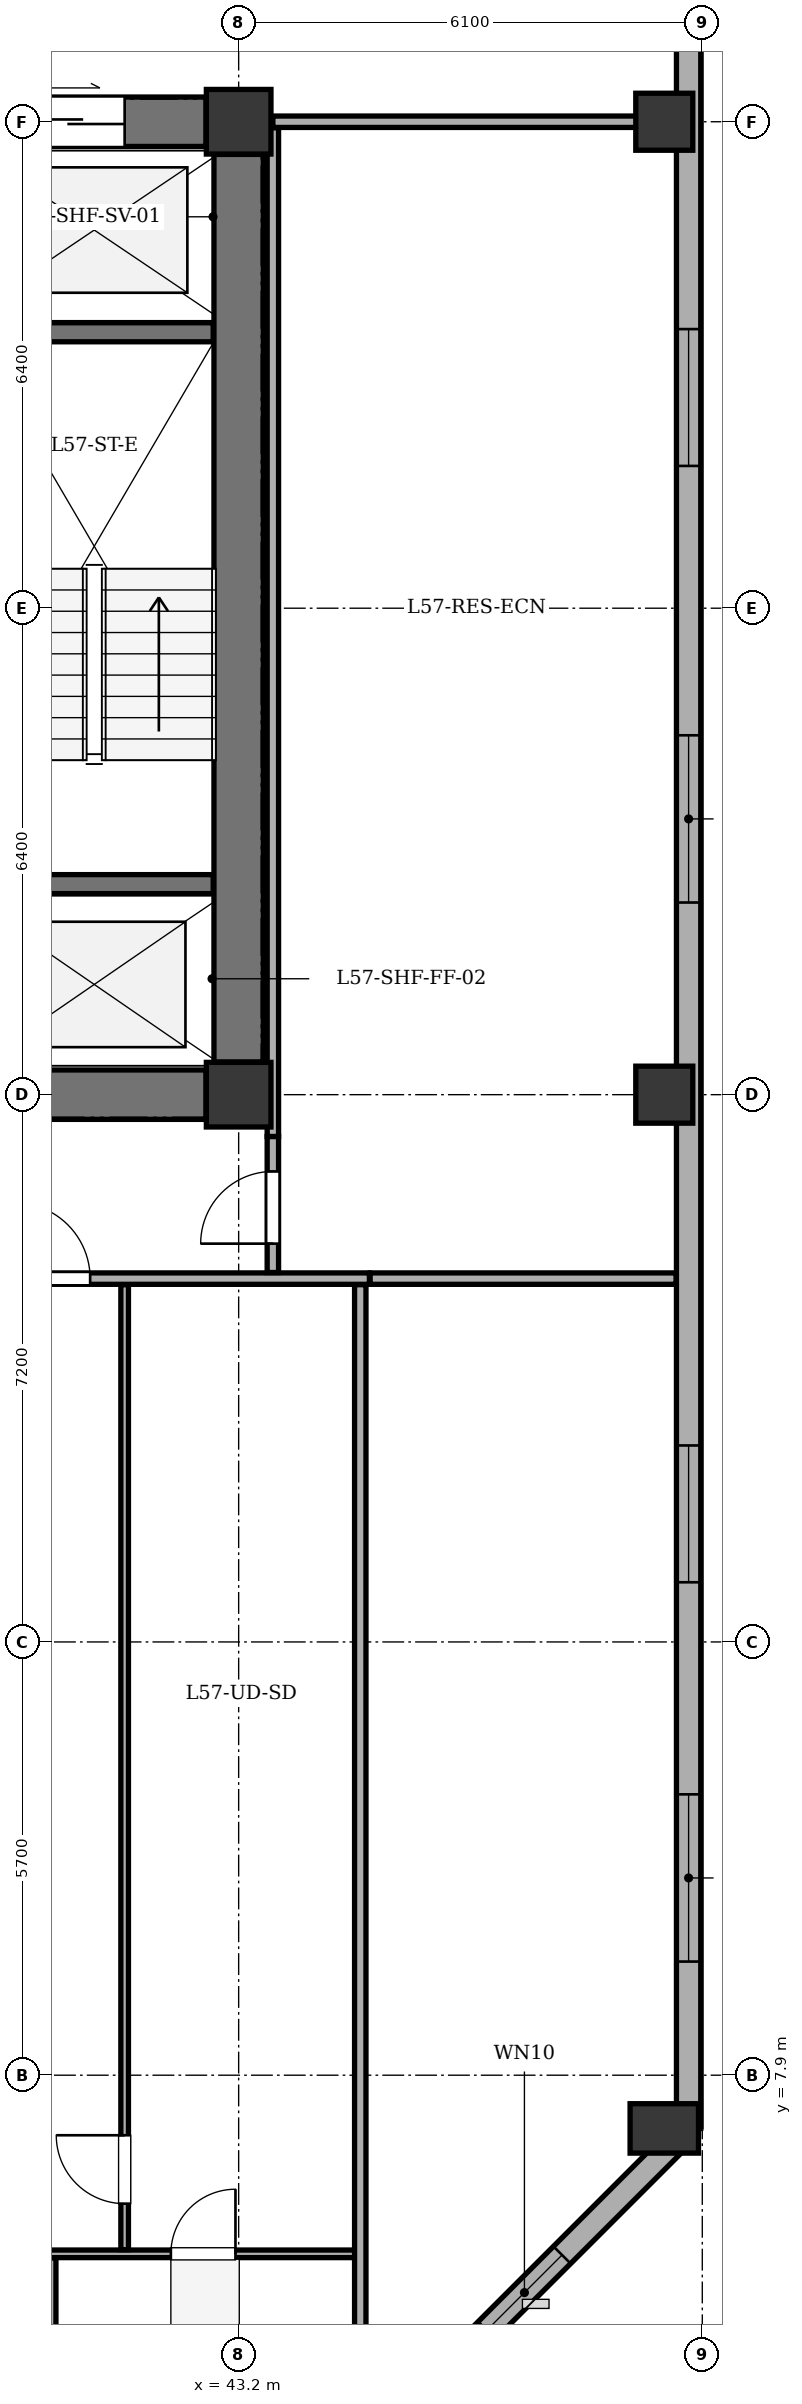
"""IFC4 building model, lengths in metres.
Left out: names, types, materials, properties, quantities, classifications, styles, units other than length and angle.
Written with IfcOpenShell. Run it as: python <this file> out.ifc"""

import sys

from ifc_helpers import new_model, si_unit, direction, frame, frame_2d, origin, origin_2d, place, context, subcontext, project, spatial, rectangle, extrude, element, fill, save


model = new_model("IFC4")
c1 = context("Model", 3, precision=1e-05, world=origin(), true_north=direction((0.0, 1.0)))
c2 = subcontext(c1, "Body", "Model", "MODEL_VIEW")
j1 = project(units=[si_unit("LENGTHUNIT", "METRE"), si_unit("PLANEANGLEUNIT", "RADIAN")], contexts=[c1])
p1 = place(None, origin())
s1 = spatial("IfcSite", under=j1, at=p1, CompositionType="ELEMENT")
p2 = place(p1, origin())
s2 = spatial("IfcBuilding", under=s1, at=p2, CompositionType="ELEMENT")
p3 = place(p2, frame((0.0, 0.0, 221.1)))
s3 = spatial("IfcBuildingStorey", under=s2, at=p3, CompositionType="ELEMENT", Elevation=221.1)
for number, where, z_axis, x_axis in (
    (1, (43.2, 20.8, 0.0), (0.0, 0.0, 1.0), (1.0, 0.0, 0.0)),
    (2, (43.2, 33.6, 0.0), (0.0, 0.0, 1.0), (1.0, 0.0, 0.0)),
):
    element("IfcColumn", number, at=place(p3, frame(where, z_axis=z_axis, x_axis=x_axis)), inside=s3, PredefinedType="COLUMN", context=c2, shape_type="SweptSolid", body=[
        extrude(rectangle(XDim=0.85, YDim=0.85, at=origin_2d()), origin(), (0.0, 0.0, 1.0), 3.4),
    ])
p4 = place(p3, frame((48.8, 7.2, 0.0), z_axis=(0.0, 0.0, 1.0), x_axis=(1.0, 0.0, 0.0)))
e3 = element("IfcColumn", 3, at=p4, inside=s3, PredefinedType="COLUMN", context=c2, shape_type="SweptSolid", body=[
    extrude(rectangle(XDim=0.65, YDim=0.9, at=origin_2d()), origin(), (0.0, 0.0, 1.0), 3.4),
])
for number, where, z_axis, x_axis in (
    (4, (48.8, 20.8, 0.0), (0.0, 0.0, 1.0), (1.0, 0.0, 0.0)),
    (5, (48.8, 33.6, 0.0), (0.0, 0.0, 1.0), (1.0, 0.0, 0.0)),
):
    element("IfcColumn", number, at=place(p3, frame(where, z_axis=z_axis, x_axis=x_axis)), inside=s3, PredefinedType="COLUMN", context=c2, shape_type="SweptSolid", body=[
        extrude(rectangle(XDim=0.75, YDim=0.75, at=origin_2d()), origin(), (0.0, 0.0, 1.0), 3.4),
    ])
p5 = place(p3, frame((49.12, 35.0, 0.0), z_axis=(0.0, 0.0, 1.0), x_axis=(0.0, -1.0, 0.0)))
e6 = element("IfcWall", 6, at=p5, inside=s3, PredefinedType="STANDARD", context=c2, shape_type="SweptSolid", body=[
    extrude(rectangle(XDim=27.8, YDim=0.32, at=frame_2d((13.9, 0.0))), origin(), (0.0, 0.0, 1.0), 2.725),
])
p6 = place(p5, frame((4.128, 0.0, 0.75)))
e7 = element("IfcOpeningElement", 7, at=p6, cuts=e6, PredefinedType="OPENING", context=c2, shape_type="SweptSolid", body=[
    extrude(rectangle(XDim=1.8, YDim=1.7, at=frame_2d((0.9, 0.85))), frame((0.0, 0.17, 0.0), z_axis=(0.0, -1.0, 0.0), x_axis=(1.0, 0.0, 0.0)), (0.0, 0.0, 1.0), 0.34),
])
p7 = place(p5, frame((9.472, 0.0, 0.75)))
e8 = element("IfcOpeningElement", 8, at=p7, cuts=e6, PredefinedType="OPENING", context=c2, shape_type="SweptSolid", body=[
    extrude(rectangle(XDim=2.2, YDim=1.7, at=frame_2d((1.1, 0.85))), frame((0.0, 0.17, 0.0), z_axis=(0.0, -1.0, 0.0), x_axis=(1.0, 0.0, 0.0)), (0.0, 0.0, 1.0), 0.34),
])
p8 = place(p5, frame((18.815, 0.0, 0.75)))
e9 = element("IfcOpeningElement", 9, at=p8, cuts=e6, PredefinedType="OPENING", context=c2, shape_type="SweptSolid", body=[
    extrude(rectangle(XDim=1.8, YDim=1.7, at=frame_2d((0.9, 0.85))), frame((0.0, 0.17, 0.0), z_axis=(0.0, -1.0, 0.0), x_axis=(1.0, 0.0, 0.0)), (0.0, 0.0, 1.0), 0.34),
])
p9 = place(p5, frame((23.405, 0.0, 0.75)))
e10 = element("IfcOpeningElement", 10, at=p9, cuts=e6, PredefinedType="OPENING", context=c2, shape_type="SweptSolid", body=[
    extrude(rectangle(XDim=2.2, YDim=1.7, at=frame_2d((1.1, 0.85))), frame((0.0, 0.17, 0.0), z_axis=(0.0, -1.0, 0.0), x_axis=(1.0, 0.0, 0.0)), (0.0, 0.0, 1.0), 0.34),
])
p10 = place(p3, frame((49.12, 7.2, 0.0), z_axis=(0.0, 0.0, 1.0), x_axis=(-0.707106781187, -0.707106781187, 0.0)))
e11 = element("IfcWall", 11, at=p10, inside=s3, PredefinedType="STANDARD", context=c2, shape_type="SweptSolid", body=[
    extrude(rectangle(XDim=6.11, YDim=0.32, at=frame_2d((3.055, 0.0))), origin(), (0.0, 0.0, 1.0), 2.725),
])
p11 = place(p10, frame((2.355, 0.0, 0.75)))
e12 = element("IfcOpeningElement", 12, at=p11, cuts=e11, PredefinedType="OPENING", context=c2, shape_type="SweptSolid", body=[
    extrude(rectangle(XDim=1.4, YDim=1.65, at=frame_2d((0.7, 0.825))), frame((0.0, 0.17, 0.0), z_axis=(0.0, -1.0, 0.0), x_axis=(1.0, 0.0, 0.0)), (0.0, 0.0, 1.0), 0.34),
])
p12 = place(p3, frame((43.2, 21.23, 0.0), z_axis=(0.0, 0.0, 1.0), x_axis=(0.0, 1.0, 0.0)))
e13 = element("IfcWall", 13, at=p12, inside=s3, PredefinedType="SHEAR", context=c2, shape_type="SweptSolid", body=[
    extrude(rectangle(XDim=11.94, YDim=0.65, at=frame_2d((5.97, 0.0))), origin(), (0.0, 0.0, 1.0), 3.1),
])
p13 = place(p3, frame((35.63, 20.8, 0.0), z_axis=(0.0, 0.0, 1.0), x_axis=(1.0, 0.0, 0.0)))
e14 = element("IfcWall", 14, at=p13, inside=s3, PredefinedType="SHEAR", context=c2, shape_type="SweptSolid", body=[
    extrude(rectangle(XDim=7.14, YDim=0.65, at=frame_2d((3.57, 0.0))), origin(), (0.0, 0.0, 1.0), 3.1),
])
p14 = place(p3, frame((35.63, 33.6, 0.0), z_axis=(0.0, 0.0, 1.0), x_axis=(1.0, 0.0, 0.0)))
e15 = element("IfcWall", 15, at=p14, inside=s3, PredefinedType="SHEAR", context=c2, shape_type="SweptSolid", body=[
    extrude(rectangle(XDim=7.14, YDim=0.65, at=frame_2d((3.57, 0.0))), origin(), (0.0, 0.0, 1.0), 3.1),
])
p15 = place(p14, frame((4.77, 0.0, 0.0)))
e16 = element("IfcOpeningElement", 16, at=p15, cuts=e15, PredefinedType="OPENING", context=c2, shape_type="SweptSolid", body=[
    extrude(rectangle(XDim=1.3, YDim=2.15, at=frame_2d((0.65, 1.075))), frame((0.0, 0.335, 0.0), z_axis=(0.0, -1.0, 0.0), x_axis=(1.0, 0.0, 0.0)), (0.0, 0.0, 1.0), 0.67),
])
p16 = place(p14, frame((2.57, 0.0, 0.0)))
e17 = element("IfcOpeningElement", 17, at=p16, cuts=e15, PredefinedType="OPENING", context=c2, shape_type="SweptSolid", body=[
    extrude(rectangle(XDim=0.85, YDim=2.02, at=frame_2d((0.425, 1.01))), frame((0.0, 0.335, 0.0), z_axis=(0.0, -1.0, 0.0), x_axis=(1.0, 0.0, 0.0)), (0.0, 0.0, 1.0), 0.67),
])
for number, where, z_axis, x_axis in (
    (18, (39.69, 23.57, 0.0), (0.0, 0.0, 1.0), (1.0, 0.0, 0.0)),
    (19, (39.69, 30.83, 0.0), (0.0, 0.0, 1.0), (1.0, 0.0, 0.0)),
):
    element("IfcWall", number, at=place(p3, frame(where, z_axis=z_axis, x_axis=x_axis)), inside=s3, PredefinedType="SHEAR", context=c2, shape_type="SweptSolid", body=[
        extrude(rectangle(XDim=3.175, YDim=0.25, at=frame_2d((1.587, 0.0))), origin(), (0.0, 0.0, 1.0), 3.1),
    ])
p17 = place(p3, frame((10.9, 18.38, 0.0), z_axis=(0.0, 0.0, 1.0), x_axis=(1.0, 0.0, 0.0)))
e20 = element("IfcWall", 20, at=p17, inside=s3, PredefinedType="PARTITIONING", context=c2, shape_type="SweptSolid", body=[
    extrude(rectangle(XDim=34.02, YDim=0.15, at=frame_2d((17.01, 0.0))), origin(), (0.0, 0.0, 1.0), 3.1),
])
p18 = place(p17, frame((3.674, 0.0, 0.0)))
e21 = element("IfcOpeningElement", 21, at=p18, cuts=e20, PredefinedType="OPENING", context=c2, shape_type="SweptSolid", body=[
    extrude(rectangle(XDim=1.0, YDim=2.1, at=frame_2d((0.5, 1.05))), frame((0.0, 0.085, 0.0), z_axis=(0.0, -1.0, 0.0), x_axis=(1.0, 0.0, 0.0)), (0.0, 0.0, 1.0), 0.17),
])
p19 = place(p17, frame((12.118, 0.0, 0.0)))
e22 = element("IfcOpeningElement", 22, at=p19, cuts=e20, PredefinedType="OPENING", context=c2, shape_type="SweptSolid", body=[
    extrude(rectangle(XDim=1.0, YDim=2.1, at=frame_2d((0.5, 1.05))), frame((0.0, 0.085, 0.0), z_axis=(0.0, -1.0, 0.0), x_axis=(1.0, 0.0, 0.0)), (0.0, 0.0, 1.0), 0.17),
])
p20 = place(p17, frame((20.901, 0.0, 0.0)))
e23 = element("IfcOpeningElement", 23, at=p20, cuts=e20, PredefinedType="OPENING", context=c2, shape_type="SweptSolid", body=[
    extrude(rectangle(XDim=1.0, YDim=2.1, at=frame_2d((0.5, 1.05))), frame((0.0, 0.085, 0.0), z_axis=(0.0, -1.0, 0.0), x_axis=(1.0, 0.0, 0.0)), (0.0, 0.0, 1.0), 0.17),
])
p21 = place(p17, frame((29.346, 0.0, 0.0)))
e24 = element("IfcOpeningElement", 24, at=p21, cuts=e20, PredefinedType="OPENING", context=c2, shape_type="SweptSolid", body=[
    extrude(rectangle(XDim=1.0, YDim=2.1, at=frame_2d((0.5, 1.05))), frame((0.0, 0.085, 0.0), z_axis=(0.0, -1.0, 0.0), x_axis=(1.0, 0.0, 0.0)), (0.0, 0.0, 1.0), 0.17),
])
p22 = place(p3, frame((36.773, 5.55, 0.0), z_axis=(0.0, 0.0, 1.0), x_axis=(1.0, 0.0, 0.0)))
e25 = element("IfcWall", 25, at=p22, inside=s3, PredefinedType="PARTITIONING", context=c2, shape_type="SweptSolid", body=[
    extrude(rectangle(XDim=8.067, YDim=0.1, at=frame_2d((4.034, 0.0))), origin(), (0.0, 0.0, 1.0), 3.1),
])
p23 = place(p22, frame((1.561, 0.0, 0.0)))
e26 = element("IfcOpeningElement", 26, at=p23, cuts=e25, PredefinedType="OPENING", context=c2, shape_type="SweptSolid", body=[
    extrude(rectangle(XDim=0.85, YDim=2.05, at=frame_2d((0.425, 1.025))), frame((0.0, 0.06, 0.0), z_axis=(0.0, -1.0, 0.0), x_axis=(1.0, 0.0, 0.0)), (0.0, 0.0, 1.0), 0.12),
])
p24 = place(p22, frame((5.535, 0.0, 0.0)))
e27 = element("IfcOpeningElement", 27, at=p24, cuts=e25, PredefinedType="OPENING", context=c2, shape_type="SweptSolid", body=[
    extrude(rectangle(XDim=0.85, YDim=2.05, at=frame_2d((0.425, 1.025))), frame((0.0, 0.06, 0.0), z_axis=(0.0, -1.0, 0.0), x_axis=(1.0, 0.0, 0.0)), (0.0, 0.0, 1.0), 0.12),
])
p25 = place(p3, frame((41.7, 5.605, 0.0), z_axis=(0.0, 0.0, 1.0), x_axis=(0.0, 1.0, 0.0)))
e28 = element("IfcWall", 28, at=p25, inside=s3, PredefinedType="PARTITIONING", context=c2, shape_type="SweptSolid", body=[
    extrude(rectangle(XDim=12.695, YDim=0.1, at=frame_2d((6.348, 0.0))), origin(), (0.0, 0.0, 1.0), 3.1),
])
p26 = place(p25, frame((0.605, 0.0, 0.0)))
e29 = element("IfcOpeningElement", 29, at=p26, cuts=e28, PredefinedType="OPENING", context=c2, shape_type="SweptSolid", body=[
    extrude(rectangle(XDim=0.9, YDim=2.05, at=frame_2d((0.45, 1.025))), frame((0.0, 0.06, 0.0), z_axis=(0.0, -1.0, 0.0), x_axis=(1.0, 0.0, 0.0)), (0.0, 0.0, 1.0), 0.12),
])
p27 = place(p3, frame((40.746, 3.045, 0.0), z_axis=(0.0, 0.0, 1.0), x_axis=(0.0, 1.0, 0.0)))
e30 = element("IfcWall", 30, at=p27, inside=s3, PredefinedType="PARTITIONING", context=c2, shape_type="SweptSolid", body=[
    extrude(rectangle(XDim=2.45, YDim=0.1, at=frame_2d((1.225, 0.0))), origin(), (0.0, 0.0, 1.0), 3.1),
])
p28 = place(p3, frame((44.8, 3.045, 0.0), z_axis=(0.0, 0.0, 1.0), x_axis=(0.0, 1.0, 0.0)))
e31 = element("IfcWall", 31, at=p28, inside=s3, PredefinedType="PARTITIONING", context=c2, shape_type="SweptSolid", body=[
    extrude(rectangle(XDim=15.255, YDim=0.15, at=frame_2d((7.627, 0.0))), origin(), (0.0, 0.0, 1.0), 3.1),
])
p29 = place(p3, frame((44.93, 18.38, 0.0), z_axis=(0.0, 0.0, 1.0), x_axis=(1.0, 0.0, 0.0)))
e32 = element("IfcWall", 32, at=p29, inside=s3, PredefinedType="PARTITIONING", context=c2, shape_type="SweptSolid", body=[
    extrude(rectangle(XDim=4.025, YDim=0.15, at=frame_2d((2.013, 0.0))), origin(), (0.0, 0.0, 1.0), 3.1),
])
p30 = place(p3, frame((43.65, 33.6, 0.0), z_axis=(0.0, 0.0, 1.0), x_axis=(1.0, 0.0, 0.0)))
e33 = element("IfcWall", 33, at=p30, inside=s3, PredefinedType="PARTITIONING", context=c2, shape_type="SweptSolid", body=[
    extrude(rectangle(XDim=5.305, YDim=0.15, at=frame_2d((2.653, 0.0))), origin(), (0.0, 0.0, 1.0), 2.535),
])
p31 = place(p3, frame((43.65, 18.46, 0.0), z_axis=(0.0, 0.0, 1.0), x_axis=(0.0, 1.0, 0.0)))
e34 = element("IfcWall", 34, at=p31, inside=s3, PredefinedType="PARTITIONING", context=c2, shape_type="SweptSolid", body=[
    extrude(rectangle(XDim=1.79, YDim=0.15, at=frame_2d((0.895, 0.0))), origin(), (0.0, 0.0, 1.0), 3.1),
])
p32 = place(p31, frame((0.38, 0.0, 0.0)))
e35 = element("IfcOpeningElement", 35, at=p32, cuts=e34, PredefinedType="OPENING", context=c2, shape_type="SweptSolid", body=[
    extrude(rectangle(XDim=0.95, YDim=2.1, at=frame_2d((0.475, 1.05))), frame((0.0, 0.085, 0.0), z_axis=(0.0, -1.0, 0.0), x_axis=(1.0, 0.0, 0.0)), (0.0, 0.0, 1.0), 0.17),
])
p33 = place(p3, frame((43.65, 20.25, 0.0), z_axis=(0.0, 0.0, 1.0), x_axis=(0.0, 1.0, 0.0)))
e36 = element("IfcWall", 36, at=p33, inside=s3, PredefinedType="PARTITIONING", context=c2, shape_type="SweptSolid", body=[
    extrude(rectangle(XDim=13.27, YDim=0.15, at=frame_2d((6.635, 0.0))), origin(), (0.0, 0.0, 1.0), 3.1),
])
p34 = place(p6, origin())
e37 = element("IfcWindow", 37, at=p34, inside=s3, PartitioningType="SINGLE_PANEL", PredefinedType="WINDOW", context=c2, shape_type="SweptSolid", body=[
    extrude(rectangle(XDim=1.8, YDim=1.7, at=frame_2d((0.9, 0.85))), frame((0.0, -0.01, 0.0), z_axis=(0.0, -1.0, 0.0), x_axis=(1.0, 0.0, 0.0)), (0.0, 0.0, 1.0), 0.06),
])
fill(e7, e37)
p35 = place(p7, origin())
e38 = element("IfcWindow", 38, at=p35, inside=s3, PartitioningType="SINGLE_PANEL", PredefinedType="WINDOW", context=c2, shape_type="SweptSolid", body=[
    extrude(rectangle(XDim=2.2, YDim=1.7, at=frame_2d((1.1, 0.85))), frame((0.0, -0.01, 0.0), z_axis=(0.0, -1.0, 0.0), x_axis=(1.0, 0.0, 0.0)), (0.0, 0.0, 1.0), 0.06),
])
fill(e8, e38)
p36 = place(p8, origin())
e39 = element("IfcWindow", 39, at=p36, inside=s3, PartitioningType="SINGLE_PANEL", PredefinedType="WINDOW", context=c2, shape_type="SweptSolid", body=[
    extrude(rectangle(XDim=1.8, YDim=1.7, at=frame_2d((0.9, 0.85))), frame((0.0, -0.01, 0.0), z_axis=(0.0, -1.0, 0.0), x_axis=(1.0, 0.0, 0.0)), (0.0, 0.0, 1.0), 0.06),
])
fill(e9, e39)
p37 = place(p9, origin())
e40 = element("IfcWindow", 40, at=p37, inside=s3, PartitioningType="SINGLE_PANEL", PredefinedType="WINDOW", context=c2, shape_type="SweptSolid", body=[
    extrude(rectangle(XDim=2.2, YDim=1.7, at=frame_2d((1.1, 0.85))), frame((0.0, -0.01, 0.0), z_axis=(0.0, -1.0, 0.0), x_axis=(1.0, 0.0, 0.0)), (0.0, 0.0, 1.0), 0.06),
])
fill(e10, e40)
p38 = place(p11, origin())
e41 = element("IfcWindow", 41, at=p38, inside=s3, PartitioningType="SINGLE_PANEL", PredefinedType="WINDOW", context=c2, shape_type="SweptSolid", body=[
    extrude(rectangle(XDim=1.4, YDim=1.65, at=frame_2d((0.7, 0.825))), frame((0.0, -0.01, 0.0), z_axis=(0.0, -1.0, 0.0), x_axis=(1.0, 0.0, 0.0)), (0.0, 0.0, 1.0), 0.06),
])
fill(e12, e41)
p39 = place(p15, origin())
e42 = element("IfcDoor", 42, at=p39, inside=s3, OperationType="DOUBLE_DOOR_SLIDING", PredefinedType="DOOR", context=c2, shape_type="SweptSolid", body=[
    extrude(rectangle(XDim=1.3, YDim=2.15, at=frame_2d((0.65, 1.075))), frame((0.0, 0.025, 0.0), z_axis=(0.0, -1.0, 0.0), x_axis=(1.0, 0.0, 0.0)), (0.0, 0.0, 1.0), 0.05),
])
fill(e16, e42)
p40 = place(p21, origin())
e43 = element("IfcDoor", 43, at=p40, inside=s3, OperationType="SINGLE_SWING_LEFT", PredefinedType="DOOR", context=c2, shape_type="SweptSolid", body=[
    extrude(rectangle(XDim=1.0, YDim=2.1, at=frame_2d((0.5, 1.05))), frame((0.0, 0.025, 0.0), z_axis=(0.0, -1.0, 0.0), x_axis=(1.0, 0.0, 0.0)), (0.0, 0.0, 1.0), 0.05),
])
fill(e24, e43)
p41 = place(p26, origin())
e44 = element("IfcDoor", 44, at=p41, inside=s3, OperationType="SINGLE_SWING_RIGHT", PredefinedType="DOOR", context=c2, shape_type="SweptSolid", body=[
    extrude(rectangle(XDim=0.9, YDim=2.05, at=frame_2d((0.45, 1.025))), frame((0.0, 0.025, 0.0), z_axis=(0.0, -1.0, 0.0), x_axis=(1.0, 0.0, 0.0)), (0.0, 0.0, 1.0), 0.05),
])
fill(e29, e44)
p42 = place(p24, origin())
e45 = element("IfcDoor", 45, at=p42, inside=s3, OperationType="SINGLE_SWING_RIGHT", PredefinedType="DOOR", context=c2, shape_type="SweptSolid", body=[
    extrude(rectangle(XDim=0.85, YDim=2.05, at=frame_2d((0.425, 1.025))), frame((0.0, 0.025, 0.0), z_axis=(0.0, -1.0, 0.0), x_axis=(1.0, 0.0, 0.0)), (0.0, 0.0, 1.0), 0.05),
])
fill(e27, e45)
p43 = place(p32, origin())
e46 = element("IfcDoor", 46, at=p43, inside=s3, OperationType="SINGLE_SWING_LEFT", PredefinedType="DOOR", context=c2, shape_type="SweptSolid", body=[
    extrude(rectangle(XDim=0.95, YDim=2.1, at=frame_2d((0.475, 1.05))), frame((0.0, 0.025, 0.0), z_axis=(0.0, -1.0, 0.0), x_axis=(1.0, 0.0, 0.0)), (0.0, 0.0, 1.0), 0.05),
])
fill(e35, e46)
save(model, sys.argv[1])
